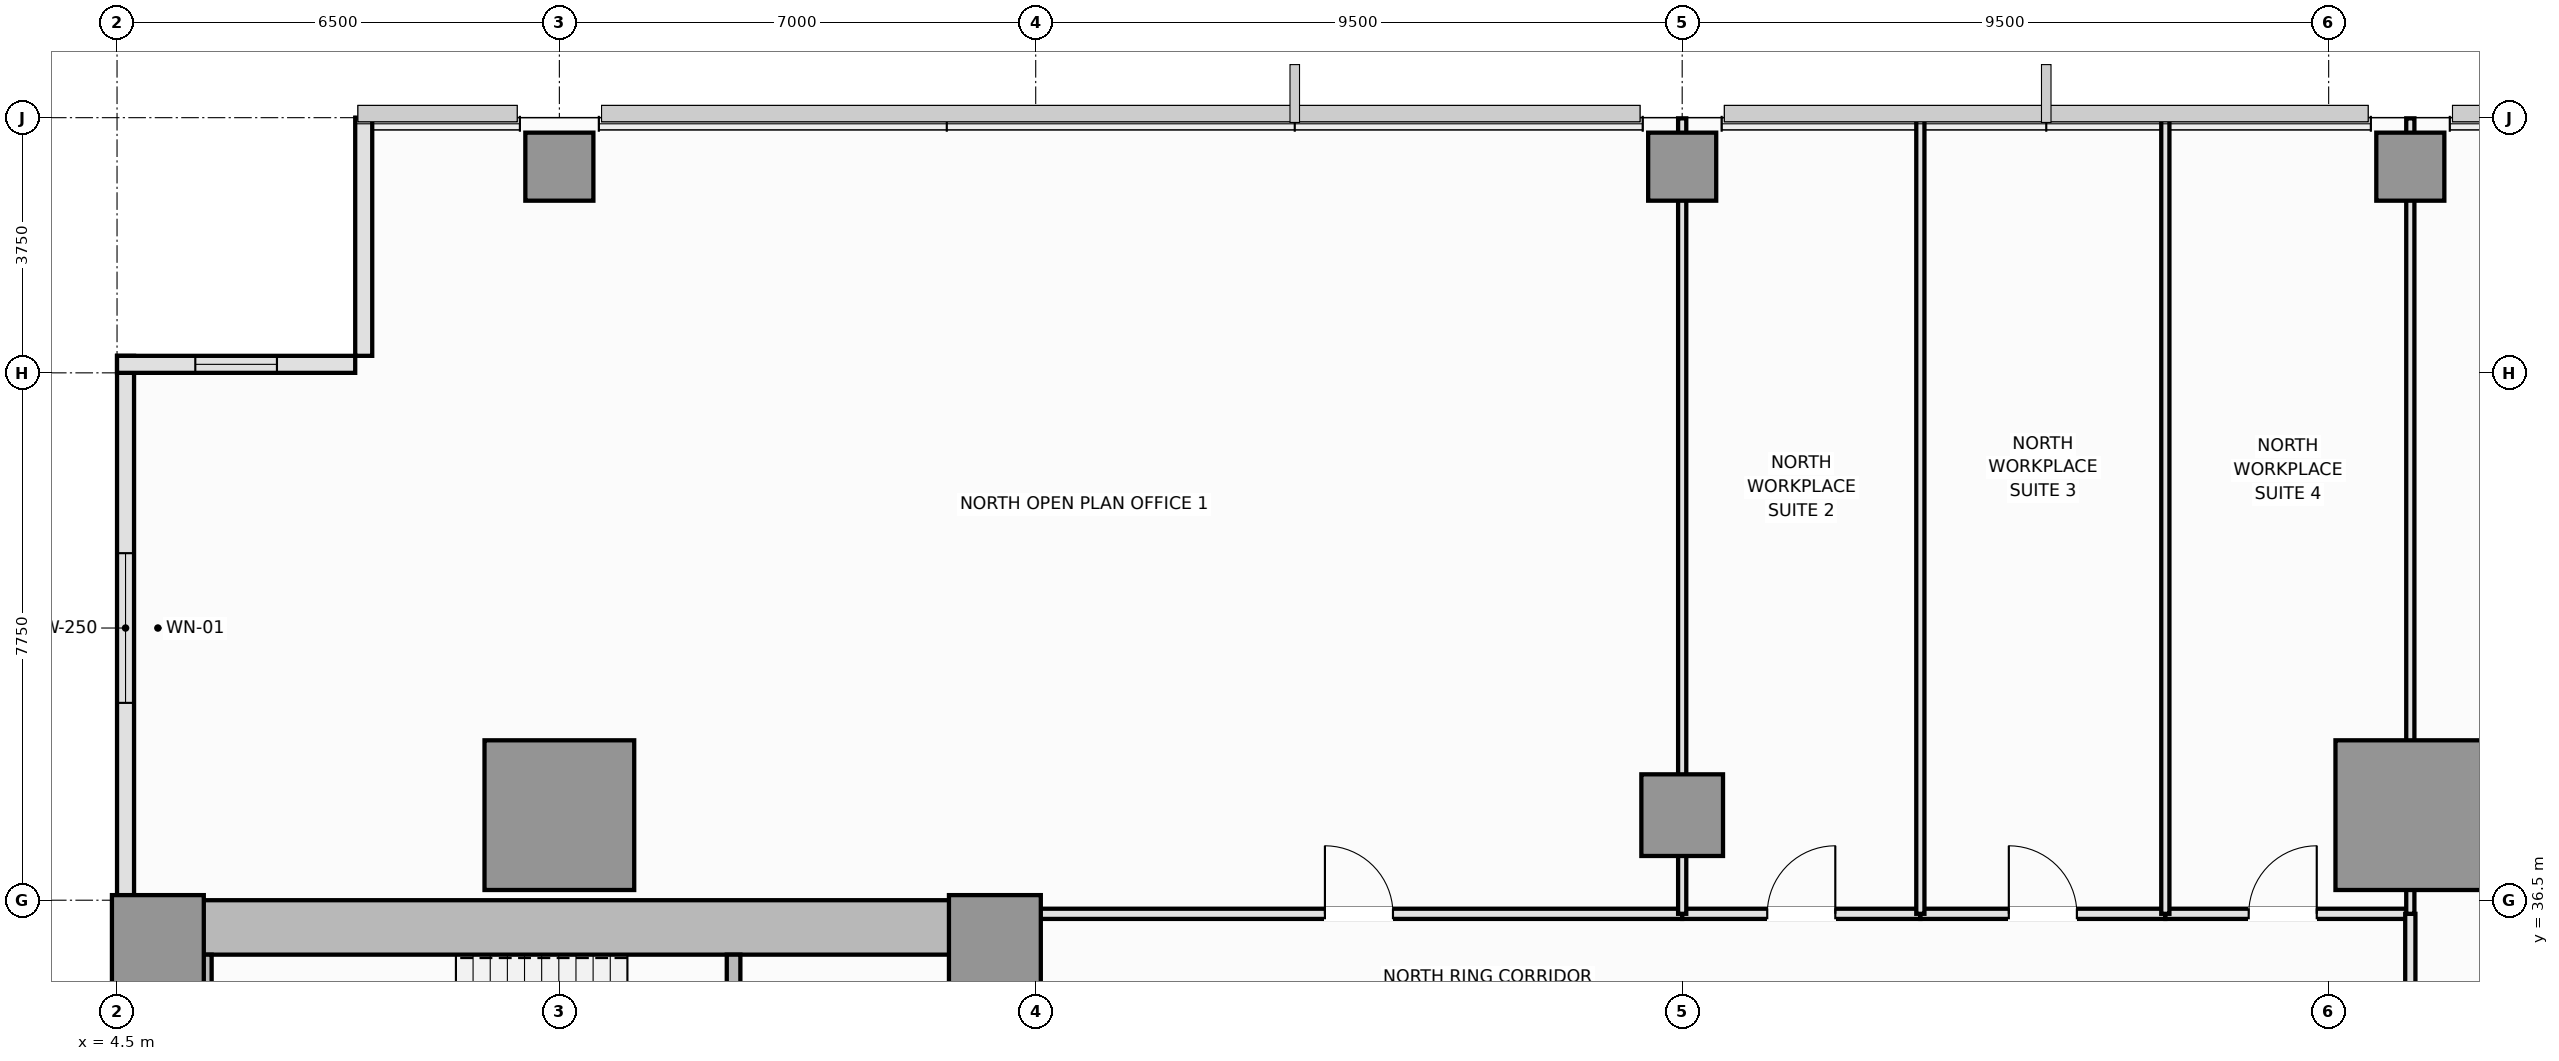
"""IFC4 building model, lengths in metres.
Left out: names, types, materials, properties, quantities, classifications, styles, units other than length and angle.
Written with IfcOpenShell. Run it as: python <this file> out.ifc"""

import sys

from ifc_helpers import new_model, si_unit, direction, frame, frame_2d, origin, origin_2d, place, context, subcontext, project, spatial, rectangle, extrude, element, fill, save


model = new_model("IFC4")
c1 = context("Model", 3, precision=1e-05, world=origin(), true_north=direction((0.0, 1.0)))
c2 = subcontext(c1, "Body", "Model", "MODEL_VIEW")
j1 = project(units=[si_unit("LENGTHUNIT", "METRE"), si_unit("PLANEANGLEUNIT", "RADIAN")], contexts=[c1])
p1 = place(None, origin())
s1 = spatial("IfcSite", under=j1, at=p1, CompositionType="ELEMENT")
p2 = place(p1, origin())
s2 = spatial("IfcBuilding", under=s1, at=p2, CompositionType="ELEMENT")
p3 = place(p2, frame((0.0, 0.0, 82.4)))
s3 = spatial("IfcBuildingStorey", under=s2, at=p3, CompositionType="ELEMENT", Elevation=82.4)
p4 = place(p3, frame((4.5, 36.1, 0.0), z_axis=(0.0, 0.0, 1.0), x_axis=(1.0, 0.0, 0.0)))
e1 = element("IfcWall", 1, at=p4, inside=s3, PredefinedType="SHEAR", context=c2, shape_type="SweptSolid", body=[
    extrude(rectangle(XDim=13.5, YDim=0.8, at=frame_2d((6.75, 0.0))), origin(), (0.0, 0.0, 1.0), 3.55),
])
p5 = place(p3, frame((4.9, 14.8, 0.0), z_axis=(0.0, 0.0, 1.0), x_axis=(0.0, 1.0, 0.0)))
e2 = element("IfcWall", 2, at=p5, inside=s3, PredefinedType="SHEAR", context=c2, shape_type="SweptSolid", body=[
    extrude(rectangle(XDim=20.9, YDim=0.8, at=frame_2d((10.45, 0.0))), origin(), (0.0, 0.0, 1.0), 3.55),
])
p6 = place(p3, frame((17.6, 27.05, 0.0), z_axis=(0.0, 0.0, 1.0), x_axis=(0.0, 1.0, 0.0)))
e3 = element("IfcWall", 3, at=p6, inside=s3, PredefinedType="SHEAR", context=c2, shape_type="SweptSolid", body=[
    extrude(rectangle(XDim=8.65, YDim=0.8, at=frame_2d((4.325, 0.0))), origin(), (0.0, 0.0, 1.0), 3.55),
])
p7 = place(p6, frame((3.45, 0.0, 0.0)))
e4 = element("IfcOpeningElement", 4, at=p7, cuts=e3, PredefinedType="OPENING", context=c2, shape_type="SweptSolid", body=[
    extrude(rectangle(XDim=1.1, YDim=2.15, at=frame_2d((0.55, 1.075))), frame((0.0, 0.41, 0.0), z_axis=(0.0, -1.0, 0.0), x_axis=(1.0, 0.0, 0.0)), (0.0, 0.0, 1.0), 0.82),
])
for number, where, z_axis, x_axis in (
    (5, (5.1, 35.9, 0.0), (0.0, 0.0, 1.0), (1.0, 0.0, 0.0)),
    (6, (17.4, 35.9, 0.0), (0.0, 0.0, 1.0), (1.0, 0.0, 0.0)),
):
    element("IfcColumn", number, at=place(p3, frame(where, z_axis=z_axis, x_axis=x_axis)), inside=s3, PredefinedType="PILASTER", context=c2, shape_type="SweptSolid", body=[
        extrude(rectangle(XDim=1.35, YDim=1.35, at=origin_2d()), origin(), (0.0, 0.0, 1.0), 3.55),
    ])
for number, where, z_axis, x_axis in (
    (7, (11.0, 37.75, 0.0), (0.0, 0.0, 1.0), (1.0, 0.0, 0.0)),
    (8, (38.2, 37.75, 0.0), (0.0, 0.0, 1.0), (1.0, 0.0, 0.0)),
):
    element("IfcColumn", number, at=place(p3, frame(where, z_axis=z_axis, x_axis=x_axis)), inside=s3, PredefinedType="COLUMN", context=c2, shape_type="SweptSolid", body=[
        extrude(rectangle(XDim=2.2, YDim=2.2, at=origin_2d()), origin(), (0.0, 0.0, 1.0), 3.55),
    ])
p8 = place(p3, frame((27.5, 37.75, 0.0), z_axis=(0.0, 0.0, 1.0), x_axis=(1.0, 0.0, 0.0)))
e9 = element("IfcColumn", 9, at=p8, inside=s3, PredefinedType="COLUMN", context=c2, shape_type="SweptSolid", body=[
    extrude(rectangle(XDim=1.2, YDim=1.2, at=origin_2d()), origin(), (0.0, 0.0, 1.0), 3.55),
])
for number, where, z_axis, x_axis in (
    (10, (11.0, 47.28, 0.0), (0.0, 0.0, 1.0), (1.0, 0.0, 0.0)),
    (11, (27.5, 47.28, 0.0), (0.0, 0.0, 1.0), (1.0, 0.0, 0.0)),
    (12, (38.2, 47.28, 0.0), (0.0, 0.0, 1.0), (1.0, 0.0, 0.0)),
):
    element("IfcColumn", number, at=place(p3, frame(where, z_axis=z_axis, x_axis=x_axis)), inside=s3, PredefinedType="COLUMN", context=c2, shape_type="SweptSolid", body=[
        extrude(rectangle(XDim=1.0, YDim=1.0, at=origin_2d()), origin(), (0.0, 0.0, 1.0), 3.55),
    ])
p9 = place(p3, frame((4.625, 44.5, 0.0), z_axis=(0.0, 0.0, 1.0), x_axis=(0.0, -1.0, 0.0)))
e13 = element("IfcWall", 13, at=p9, inside=s3, PredefinedType="SOLIDWALL", context=c2, shape_type="SweptSolid", body=[
    extrude(rectangle(XDim=8.0, YDim=0.25, at=frame_2d((4.0, 0.0))), origin(), (0.0, 0.0, 1.0), 3.37),
])
p10 = place(p9, frame((2.9, 0.0, 0.9)))
e14 = element("IfcOpeningElement", 14, at=p10, cuts=e13, PredefinedType="OPENING", context=c2, shape_type="SweptSolid", body=[
    extrude(rectangle(XDim=2.2, YDim=1.8, at=frame_2d((1.1, 0.9))), frame((0.0, 0.135, 0.0), z_axis=(0.0, -1.0, 0.0), x_axis=(1.0, 0.0, 0.0)), (0.0, 0.0, 1.0), 0.27),
])
p11 = place(p3, frame((8.125, 48.0, 0.0), z_axis=(0.0, 0.0, 1.0), x_axis=(0.0, -1.0, 0.0)))
e15 = element("IfcWall", 15, at=p11, inside=s3, PredefinedType="SOLIDWALL", context=c2, shape_type="SweptSolid", body=[
    extrude(rectangle(XDim=3.5, YDim=0.25, at=frame_2d((1.75, 0.0))), origin(), (0.0, 0.0, 1.0), 3.37),
])
p12 = place(p3, frame((8.0, 44.375, 0.0), z_axis=(0.0, 0.0, 1.0), x_axis=(-1.0, 0.0, 0.0)))
e16 = element("IfcWall", 16, at=p12, inside=s3, PredefinedType="SOLIDWALL", context=c2, shape_type="SweptSolid", body=[
    extrude(rectangle(XDim=3.5, YDim=0.25, at=frame_2d((1.75, 0.0))), origin(), (0.0, 0.0, 1.0), 3.37),
])
p13 = place(p12, frame((1.15, 0.0, 0.9)))
e17 = element("IfcOpeningElement", 17, at=p13, cuts=e16, PredefinedType="OPENING", context=c2, shape_type="SweptSolid", body=[
    extrude(rectangle(XDim=1.2, YDim=1.8, at=frame_2d((0.6, 0.9))), frame((0.0, 0.135, 0.0), z_axis=(0.0, -1.0, 0.0), x_axis=(1.0, 0.0, 0.0)), (0.0, 0.0, 1.0), 0.27),
])
p14 = place(p3, frame((5.79, 32.65, 0.0), z_axis=(0.0, 0.0, 1.0), x_axis=(0.0, 1.0, 0.0)))
e18 = element("IfcWall", 18, at=p14, inside=s3, PredefinedType="SOLIDWALL", context=c2, shape_type="SweptSolid", body=[
    extrude(rectangle(XDim=3.05, YDim=0.2, at=frame_2d((1.525, 0.0))), origin(), (0.0, 0.0, 1.0), 3.55),
])
p15 = place(p3, frame((13.56, 32.65, 0.0), z_axis=(0.0, 0.0, 1.0), x_axis=(0.0, 1.0, 0.0)))
e19 = element("IfcWall", 19, at=p15, inside=s3, PredefinedType="SOLIDWALL", context=c2, shape_type="SweptSolid", body=[
    extrude(rectangle(XDim=3.05, YDim=0.2, at=frame_2d((1.525, 0.0))), origin(), (0.0, 0.0, 1.0), 3.55),
])
p16 = place(p15, frame((0.95, 0.0, 0.0)))
e20 = element("IfcOpeningElement", 20, at=p16, cuts=e19, PredefinedType="OPENING", context=c2, shape_type="SweptSolid", body=[
    extrude(rectangle(XDim=1.15, YDim=2.15, at=frame_2d((0.575, 1.075))), frame((0.0, 0.11, 0.0), z_axis=(0.0, -1.0, 0.0), x_axis=(1.0, 0.0, 0.0)), (0.0, 0.0, 1.0), 0.22),
])
p17 = place(p3, frame((18.0, 36.3, 0.0), z_axis=(0.0, 0.0, 1.0), x_axis=(1.0, 0.0, 0.0)))
e21 = element("IfcWall", 21, at=p17, inside=s3, PredefinedType="PARTITIONING", context=c2, shape_type="SweptSolid", body=[
    extrude(rectangle(XDim=9.5, YDim=0.15, at=frame_2d((4.75, 0.0))), origin(), (0.0, 0.0, 1.0), 3.37),
])
p18 = place(p17, frame((4.25, 0.0, 0.0)))
e22 = element("IfcOpeningElement", 22, at=p18, cuts=e21, PredefinedType="OPENING", context=c2, shape_type="SweptSolid", body=[
    extrude(rectangle(XDim=1.0, YDim=2.15, at=frame_2d((0.5, 1.075))), frame((0.0, 0.085, 0.0), z_axis=(0.0, -1.0, 0.0), x_axis=(1.0, 0.0, 0.0)), (0.0, 0.0, 1.0), 0.17),
])
p19 = place(p3, frame((27.5, 36.3, 0.0), z_axis=(0.0, 0.0, 1.0), x_axis=(1.0, 0.0, 0.0)))
e23 = element("IfcWall", 23, at=p19, inside=s3, PredefinedType="PARTITIONING", context=c2, shape_type="SweptSolid", body=[
    extrude(rectangle(XDim=3.5, YDim=0.15, at=frame_2d((1.75, 0.0))), origin(), (0.0, 0.0, 1.0), 3.37),
])
p20 = place(p19, frame((1.25, 0.0, 0.0)))
e24 = element("IfcOpeningElement", 24, at=p20, cuts=e23, PredefinedType="OPENING", context=c2, shape_type="SweptSolid", body=[
    extrude(rectangle(XDim=1.0, YDim=2.15, at=frame_2d((0.5, 1.075))), frame((0.0, 0.085, 0.0), z_axis=(0.0, -1.0, 0.0), x_axis=(1.0, 0.0, 0.0)), (0.0, 0.0, 1.0), 0.17),
])
p21 = place(p3, frame((31.0, 36.3, 0.0), z_axis=(0.0, 0.0, 1.0), x_axis=(1.0, 0.0, 0.0)))
e25 = element("IfcWall", 25, at=p21, inside=s3, PredefinedType="PARTITIONING", context=c2, shape_type="SweptSolid", body=[
    extrude(rectangle(XDim=3.6, YDim=0.15, at=frame_2d((1.8, 0.0))), origin(), (0.0, 0.0, 1.0), 3.37),
])
p22 = place(p21, frame((1.3, 0.0, 0.0)))
e26 = element("IfcOpeningElement", 26, at=p22, cuts=e25, PredefinedType="OPENING", context=c2, shape_type="SweptSolid", body=[
    extrude(rectangle(XDim=1.0, YDim=2.15, at=frame_2d((0.5, 1.075))), frame((0.0, 0.085, 0.0), z_axis=(0.0, -1.0, 0.0), x_axis=(1.0, 0.0, 0.0)), (0.0, 0.0, 1.0), 0.17),
])
p23 = place(p3, frame((34.6, 36.3, 0.0), z_axis=(0.0, 0.0, 1.0), x_axis=(1.0, 0.0, 0.0)))
e27 = element("IfcWall", 27, at=p23, inside=s3, PredefinedType="PARTITIONING", context=c2, shape_type="SweptSolid", body=[
    extrude(rectangle(XDim=3.6, YDim=0.15, at=frame_2d((1.8, 0.0))), origin(), (0.0, 0.0, 1.0), 3.37),
])
p24 = place(p23, frame((1.225, 0.0, 0.0)))
e28 = element("IfcOpeningElement", 28, at=p24, cuts=e27, PredefinedType="OPENING", context=c2, shape_type="SweptSolid", body=[
    extrude(rectangle(XDim=1.0, YDim=2.15, at=frame_2d((0.5, 1.075))), frame((0.0, 0.085, 0.0), z_axis=(0.0, -1.0, 0.0), x_axis=(1.0, 0.0, 0.0)), (0.0, 0.0, 1.0), 0.17),
])
p25 = place(p3, frame((38.2, 34.4, 0.0), z_axis=(0.0, 0.0, 1.0), x_axis=(0.0, 1.0, 0.0)))
e29 = element("IfcWall", 29, at=p25, inside=s3, PredefinedType="PARTITIONING", context=c2, shape_type="SweptSolid", body=[
    extrude(rectangle(XDim=1.9, YDim=0.15, at=frame_2d((0.95, 0.0))), origin(), (0.0, 0.0, 1.0), 2.82),
])
p26 = place(p3, frame((27.5, 36.3, 0.0), z_axis=(0.0, 0.0, 1.0), x_axis=(0.0, 1.0, 0.0)))
e30 = element("IfcWall", 30, at=p26, inside=s3, PredefinedType="PARTITIONING", context=c2, shape_type="SweptSolid", body=[
    extrude(rectangle(XDim=11.69, YDim=0.12, at=frame_2d((5.845, 0.0))), origin(), (0.0, 0.0, 1.0), 2.82),
])
for number, where, z_axis, x_axis in (
    (31, (31.0, 36.3, 0.0), (0.0, 0.0, 1.0), (0.0, 1.0, 0.0)),
    (32, (34.6, 36.3, 0.0), (0.0, 0.0, 1.0), (0.0, 1.0, 0.0)),
):
    element("IfcWall", number, at=place(p3, frame(where, z_axis=z_axis, x_axis=x_axis)), inside=s3, PredefinedType="PARTITIONING", context=c2, shape_type="SweptSolid", body=[
        extrude(rectangle(XDim=11.69, YDim=0.12, at=frame_2d((5.845, 0.0))), origin(), (0.0, 0.0, 1.0), 3.37),
    ])
p27 = place(p3, frame((38.2, 36.3, 0.0), z_axis=(0.0, 0.0, 1.0), x_axis=(0.0, 1.0, 0.0)))
e33 = element("IfcWall", 33, at=p27, inside=s3, PredefinedType="PARTITIONING", context=c2, shape_type="SweptSolid", body=[
    extrude(rectangle(XDim=11.69, YDim=0.12, at=frame_2d((5.845, 0.0))), origin(), (0.0, 0.0, 1.0), 2.82),
])
p28 = place(p10, origin())
e34 = element("IfcWindow", 34, at=p28, inside=s3, PartitioningType="SINGLE_PANEL", PredefinedType="WINDOW", context=c2, shape_type="SweptSolid", body=[
    extrude(rectangle(XDim=2.2, YDim=1.8, at=frame_2d((1.1, 0.9))), frame((0.0, 0.03, 0.0), z_axis=(0.0, -1.0, 0.0), x_axis=(1.0, 0.0, 0.0)), (0.0, 0.0, 1.0), 0.06),
])
fill(e14, e34)
p29 = place(p13, origin())
e35 = element("IfcWindow", 35, at=p29, inside=s3, PartitioningType="SINGLE_PANEL", PredefinedType="WINDOW", context=c2, shape_type="SweptSolid", body=[
    extrude(rectangle(XDim=1.2, YDim=1.8, at=frame_2d((0.6, 0.9))), frame((0.0, 0.03, 0.0), z_axis=(0.0, -1.0, 0.0), x_axis=(1.0, 0.0, 0.0)), (0.0, 0.0, 1.0), 0.06),
])
fill(e17, e35)
p30 = place(p18, origin())
e36 = element("IfcDoor", 36, at=p30, inside=s3, OperationType="SINGLE_SWING_LEFT", PredefinedType="DOOR", context=c2, shape_type="SweptSolid", body=[
    extrude(rectangle(XDim=1.0, YDim=2.15, at=frame_2d((0.5, 1.075))), frame((0.0, 0.025, 0.0), z_axis=(0.0, -1.0, 0.0), x_axis=(1.0, 0.0, 0.0)), (0.0, 0.0, 1.0), 0.05),
])
fill(e22, e36)
p31 = place(p20, origin())
e37 = element("IfcDoor", 37, at=p31, inside=s3, OperationType="SINGLE_SWING_RIGHT", PredefinedType="DOOR", context=c2, shape_type="SweptSolid", body=[
    extrude(rectangle(XDim=1.0, YDim=2.15, at=frame_2d((0.5, 1.075))), frame((0.0, 0.025, 0.0), z_axis=(0.0, -1.0, 0.0), x_axis=(1.0, 0.0, 0.0)), (0.0, 0.0, 1.0), 0.05),
])
fill(e24, e37)
p32 = place(p22, origin())
e38 = element("IfcDoor", 38, at=p32, inside=s3, OperationType="SINGLE_SWING_LEFT", PredefinedType="DOOR", context=c2, shape_type="SweptSolid", body=[
    extrude(rectangle(XDim=1.0, YDim=2.15, at=frame_2d((0.5, 1.075))), frame((0.0, 0.025, 0.0), z_axis=(0.0, -1.0, 0.0), x_axis=(1.0, 0.0, 0.0)), (0.0, 0.0, 1.0), 0.05),
])
fill(e26, e38)
p33 = place(p24, origin())
e39 = element("IfcDoor", 39, at=p33, inside=s3, OperationType="SINGLE_SWING_RIGHT", PredefinedType="DOOR", context=c2, shape_type="SweptSolid", body=[
    extrude(rectangle(XDim=1.0, YDim=2.15, at=frame_2d((0.5, 1.075))), frame((0.0, 0.025, 0.0), z_axis=(0.0, -1.0, 0.0), x_axis=(1.0, 0.0, 0.0)), (0.0, 0.0, 1.0), 0.05),
])
fill(e28, e39)
save(model, sys.argv[1])
